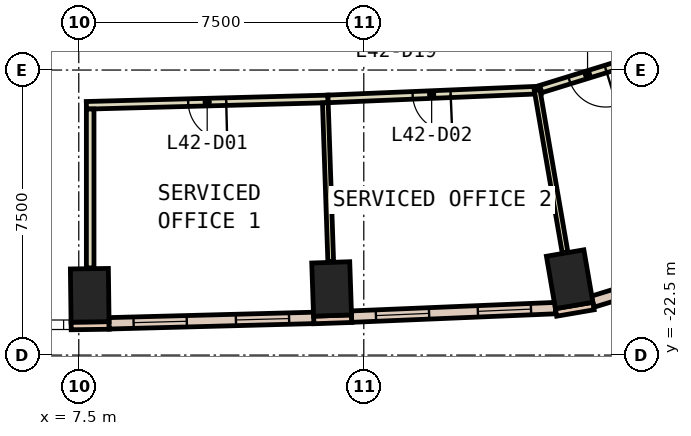
"""IFC4 building model, lengths in metres.
Left out: names, types, materials, properties, quantities, classifications, styles, units other than length and angle.
Written with IfcOpenShell. Run it as: python <this file> out.ifc"""

import sys

from ifc_helpers import new_model, si_unit, direction, frame, frame_2d, origin, origin_2d, place, context, subcontext, project, spatial, rectangle, extrude, element, fill, save


model = new_model("IFC4")
c1 = context("Model", 3, precision=1e-05, world=origin(), true_north=direction((0.0, 1.0)))
c2 = subcontext(c1, "Body", "Model", "MODEL_VIEW")
j1 = project(units=[si_unit("LENGTHUNIT", "METRE"), si_unit("PLANEANGLEUNIT", "RADIAN")], contexts=[c1])
p1 = place(None, origin())
s1 = spatial("IfcSite", under=j1, at=p1, CompositionType="ELEMENT")
p2 = place(p1, origin())
s2 = spatial("IfcBuilding", under=s1, at=p2, CompositionType="ELEMENT")
p3 = place(p2, frame((0.0, 0.0, 189.8)))
s3 = spatial("IfcBuildingStorey", under=s2, at=p3, CompositionType="ELEMENT", Elevation=189.8)
for number, where, z_axis, x_axis in (
    (1, (7.788, -20.927, 0.0), (0.0, 0.0, 1.0), (1.0, 0.013, 0.0)),
    (2, (14.154, -20.76, 0.0), (0.0, 0.0, 1.0), (0.999, 0.034, 0.0)),
    (3, (20.417, -20.505, 0.0), (0.0, 0.0, 1.0), (0.986, 0.169, 0.0)),
):
    element("IfcColumn", number, at=place(p3, frame(where, z_axis=z_axis, x_axis=x_axis)), inside=s3, PredefinedType="COLUMN", context=c2, shape_type="SweptSolid", body=[
        extrude(rectangle(XDim=1.0, YDim=1.4, at=origin_2d()), origin(), (0.0, 0.0, 1.0), 3.8),
    ])
p4 = place(p3, frame((7.299, -21.734, 0.0), z_axis=(0.0, 0.0, 1.0), x_axis=(0.999903186316, 0.013914668364, 0.0)))
e4 = element("IfcWall", 4, at=p4, inside=s3, PredefinedType="STANDARD", context=c2, shape_type="SweptSolid", body=[
    extrude(rectangle(XDim=1.0, YDim=0.2, at=frame_2d((0.5, 0.0))), origin(), (0.0, 0.0, 1.0), 3.8),
])
p5 = place(p3, frame((13.682, -21.576, 0.0), z_axis=(0.0, 0.0, 1.0), x_axis=(0.999423561854, 0.033949138587, 0.0)))
e5 = element("IfcWall", 5, at=p5, inside=s3, PredefinedType="STANDARD", context=c2, shape_type="SweptSolid", body=[
    extrude(rectangle(XDim=1.0, YDim=0.2, at=frame_2d((0.5, 0.0))), origin(), (0.0, 0.0, 1.0), 3.8),
])
p6 = place(p3, frame((20.059, -21.378, 0.0), z_axis=(0.0, 0.0, 1.0), x_axis=(0.985631544579, 0.168909615862, 0.0)))
e6 = element("IfcWall", 6, at=p6, inside=s3, PredefinedType="STANDARD", context=c2, shape_type="SweptSolid", body=[
    extrude(rectangle(XDim=1.0, YDim=0.2, at=frame_2d((0.5, 0.0))), origin(), (0.0, 0.0, 1.0), 3.8),
])
p7 = place(p3, frame((8.297, -21.664, 0.0), z_axis=(0.0, 0.0, 1.0), x_axis=(0.999651908676, 0.026382977093, 0.0)))
e7 = element("IfcWall", 7, at=p7, inside=s3, PredefinedType="STANDARD", context=c2, shape_type="SweptSolid", body=[
    extrude(rectangle(XDim=5.386, YDim=0.3, at=frame_2d((2.693, 0.0))), origin(), (0.0, 0.0, 1.0), 3.8),
])
p8 = place(p7, frame((0.646, 0.0, 0.9)))
e8 = element("IfcOpeningElement", 8, at=p8, cuts=e7, PredefinedType="OPENING", context=c2, shape_type="SweptSolid", body=[
    extrude(rectangle(XDim=1.4, YDim=2.6, at=frame_2d((0.7, 1.3))), frame((0.0, 0.16, 0.0), z_axis=(0.0, -1.0, 0.0), x_axis=(1.0, 0.0, 0.0)), (0.0, 0.0, 1.0), 0.32),
])
p9 = place(p7, frame((3.339, 0.0, 0.9)))
e9 = element("IfcOpeningElement", 9, at=p9, cuts=e7, PredefinedType="OPENING", context=c2, shape_type="SweptSolid", body=[
    extrude(rectangle(XDim=1.4, YDim=2.6, at=frame_2d((0.7, 1.3))), frame((0.0, 0.16, 0.0), z_axis=(0.0, -1.0, 0.0), x_axis=(1.0, 0.0, 0.0)), (0.0, 0.0, 1.0), 0.32),
])
p10 = place(p3, frame((14.678, -21.488, 0.0), z_axis=(0.0, 0.0, 1.0), x_axis=(0.999127941775, 0.041753514387, 0.0)))
e10 = element("IfcWall", 10, at=p10, inside=s3, PredefinedType="STANDARD", context=c2, shape_type="SweptSolid", body=[
    extrude(rectangle(XDim=5.368, YDim=0.3, at=frame_2d((2.684, 0.0))), origin(), (0.0, 0.0, 1.0), 3.8),
])
p11 = place(p10, frame((0.642, 0.0, 0.9)))
e11 = element("IfcOpeningElement", 11, at=p11, cuts=e10, PredefinedType="OPENING", context=c2, shape_type="SweptSolid", body=[
    extrude(rectangle(XDim=1.4, YDim=2.6, at=frame_2d((0.7, 1.3))), frame((0.0, 0.16, 0.0), z_axis=(0.0, -1.0, 0.0), x_axis=(1.0, 0.0, 0.0)), (0.0, 0.0, 1.0), 0.32),
])
p12 = place(p10, frame((3.326, 0.0, 0.9)))
e12 = element("IfcOpeningElement", 12, at=p12, cuts=e10, PredefinedType="OPENING", context=c2, shape_type="SweptSolid", body=[
    extrude(rectangle(XDim=1.4, YDim=2.6, at=frame_2d((0.7, 1.3))), frame((0.0, 0.16, 0.0), z_axis=(0.0, -1.0, 0.0), x_axis=(1.0, 0.0, 0.0)), (0.0, 0.0, 1.0), 0.32),
])
p13 = place(p3, frame((21.024, -21.095, 0.0), z_axis=(0.0, 0.0, 1.0), x_axis=(0.955692086233, 0.29436819854, 0.0)))
e13 = element("IfcWall", 13, at=p13, inside=s3, PredefinedType="STANDARD", context=c2, shape_type="SweptSolid", body=[
    extrude(rectangle(XDim=3.767, YDim=0.3, at=frame_2d((1.884, 0.0))), origin(), (0.0, 0.0, 1.0), 3.8),
])
p14 = place(p13, frame((1.183, 0.0, 0.9)))
e14 = element("IfcOpeningElement", 14, at=p14, cuts=e13, PredefinedType="OPENING", context=c2, shape_type="SweptSolid", body=[
    extrude(rectangle(XDim=1.4, YDim=2.6, at=frame_2d((0.7, 1.3))), frame((0.0, 0.16, 0.0), z_axis=(0.0, -1.0, 0.0), x_axis=(1.0, 0.0, 0.0)), (0.0, 0.0, 1.0), 0.32),
])
p15 = place(p3, frame((14.059, -15.76, 0.0), z_axis=(0.0, 0.0, 1.0), x_axis=(-0.999651338269, -0.026404580978, 0.0)))
e15 = element("IfcWall", 15, at=p15, inside=s3, PredefinedType="PARTITIONING", context=c2, shape_type="SweptSolid", body=[
    extrude(rectangle(XDim=6.361, YDim=0.2, at=frame_2d((3.181, 0.0))), origin(), (0.0, 0.0, 1.0), 3.8),
])
p16 = place(p15, frame((2.681, 0.0, 0.0)))
e16 = element("IfcOpeningElement", 16, at=p16, cuts=e15, PredefinedType="OPENING", context=c2, shape_type="SweptSolid", body=[
    extrude(rectangle(XDim=1.0, YDim=2.1, at=frame_2d((0.5, 1.05))), frame((0.0, 0.11, 0.0), z_axis=(0.0, -1.0, 0.0), x_axis=(1.0, 0.0, 0.0)), (0.0, 0.0, 1.0), 0.22),
])
p17 = place(p3, frame((19.661, -15.525, 0.0), z_axis=(0.0, 0.0, 1.0), x_axis=(-0.999127706659, -0.041759140148, 0.0)))
e17 = element("IfcWall", 17, at=p17, inside=s3, PredefinedType="PARTITIONING", context=c2, shape_type="SweptSolid", body=[
    extrude(rectangle(XDim=5.607, YDim=0.2, at=frame_2d((2.803, 0.0))), origin(), (0.0, 0.0, 1.0), 3.8),
])
p18 = place(p17, frame((2.378, 0.0, 0.0)))
e18 = element("IfcOpeningElement", 18, at=p18, cuts=e17, PredefinedType="OPENING", context=c2, shape_type="SweptSolid", body=[
    extrude(rectangle(XDim=1.0, YDim=2.1, at=frame_2d((0.5, 1.05))), frame((0.0, 0.11, 0.0), z_axis=(0.0, -1.0, 0.0), x_axis=(1.0, 0.0, 0.0)), (0.0, 0.0, 1.0), 0.22),
])
p19 = place(p3, frame((22.119, -14.741, 0.0), z_axis=(0.0, 0.0, 1.0), x_axis=(-0.955612889251, -0.294625195625, 0.0)))
e19 = element("IfcWall", 19, at=p19, inside=s3, PredefinedType="PARTITIONING", context=c2, shape_type="SweptSolid", body=[
    extrude(rectangle(XDim=2.576, YDim=0.2, at=frame_2d((1.288, 0.0))), origin(), (0.0, 0.0, 1.0), 3.8),
])
p20 = place(p19, frame((0.788, 0.0, 0.0)))
e20 = element("IfcOpeningElement", 20, at=p20, cuts=e19, PredefinedType="OPENING", context=c2, shape_type="SweptSolid", body=[
    extrude(rectangle(XDim=1.0, YDim=2.1, at=frame_2d((0.5, 1.05))), frame((0.0, 0.11, 0.0), z_axis=(0.0, -1.0, 0.0), x_axis=(1.0, 0.0, 0.0)), (0.0, 0.0, 1.0), 0.22),
])
p21 = place(p3, frame((7.8, -16.025, 0.0), z_axis=(0.0, 0.0, 1.0), x_axis=(0.0, -1.0, 0.0)))
e21 = element("IfcWall", 21, at=p21, inside=s3, PredefinedType="PARTITIONING", context=c2, shape_type="SweptSolid", body=[
    extrude(rectangle(XDim=4.182, YDim=0.2, at=frame_2d((2.091, 0.0))), origin(), (0.0, 0.0, 1.0), 3.8),
])
p22 = place(p3, frame((13.988, -15.862, 0.0), z_axis=(0.0, 0.0, 1.0), x_axis=(0.033931247732, -0.999424169423, 0.0)))
e22 = element("IfcWall", 22, at=p22, inside=s3, PredefinedType="PARTITIONING", context=c2, shape_type="SweptSolid", body=[
    extrude(rectangle(XDim=4.18, YDim=0.15, at=frame_2d((2.09, 0.0))), origin(), (0.0, 0.0, 1.0), 3.8),
])
p23 = place(p3, frame((19.561, -15.529, 0.0), z_axis=(0.0, 0.0, 1.0), x_axis=(0.169546150064, -0.98552224886, 0.0)))
e23 = element("IfcWall", 23, at=p23, inside=s3, PredefinedType="PARTITIONING", context=c2, shape_type="SweptSolid", body=[
    extrude(rectangle(XDim=4.329, YDim=0.15, at=frame_2d((2.164, 0.0))), origin(), (0.0, 0.0, 1.0), 3.8),
])
p24 = place(p8, origin())
e24 = element("IfcWindow", 24, at=p24, inside=s3, PartitioningType="SINGLE_PANEL", PredefinedType="WINDOW", context=c2, shape_type="SweptSolid", body=[
    extrude(rectangle(XDim=1.4, YDim=2.6, at=frame_2d((0.7, 1.3))), frame((0.0, 0.03, 0.0), z_axis=(0.0, -1.0, 0.0), x_axis=(1.0, 0.0, 0.0)), (0.0, 0.0, 1.0), 0.06),
])
fill(e8, e24)
p25 = place(p9, origin())
e25 = element("IfcWindow", 25, at=p25, inside=s3, PartitioningType="SINGLE_PANEL", PredefinedType="WINDOW", context=c2, shape_type="SweptSolid", body=[
    extrude(rectangle(XDim=1.4, YDim=2.6, at=frame_2d((0.7, 1.3))), frame((0.0, 0.03, 0.0), z_axis=(0.0, -1.0, 0.0), x_axis=(1.0, 0.0, 0.0)), (0.0, 0.0, 1.0), 0.06),
])
fill(e9, e25)
p26 = place(p11, origin())
e26 = element("IfcWindow", 26, at=p26, inside=s3, PartitioningType="SINGLE_PANEL", PredefinedType="WINDOW", context=c2, shape_type="SweptSolid", body=[
    extrude(rectangle(XDim=1.4, YDim=2.6, at=frame_2d((0.7, 1.3))), frame((0.0, 0.03, 0.0), z_axis=(0.0, -1.0, 0.0), x_axis=(1.0, 0.0, 0.0)), (0.0, 0.0, 1.0), 0.06),
])
fill(e11, e26)
p27 = place(p12, origin())
e27 = element("IfcWindow", 27, at=p27, inside=s3, PartitioningType="SINGLE_PANEL", PredefinedType="WINDOW", context=c2, shape_type="SweptSolid", body=[
    extrude(rectangle(XDim=1.4, YDim=2.6, at=frame_2d((0.7, 1.3))), frame((0.0, 0.03, 0.0), z_axis=(0.0, -1.0, 0.0), x_axis=(1.0, 0.0, 0.0)), (0.0, 0.0, 1.0), 0.06),
])
fill(e12, e27)
p28 = place(p16, origin())
e28 = element("IfcDoor", 28, at=p28, inside=s3, OperationType="SINGLE_SWING_LEFT", PredefinedType="DOOR", context=c2, shape_type="SweptSolid", body=[
    extrude(rectangle(XDim=1.0, YDim=2.1, at=frame_2d((0.5, 1.05))), frame((0.0, 0.025, 0.0), z_axis=(0.0, -1.0, 0.0), x_axis=(1.0, 0.0, 0.0)), (0.0, 0.0, 1.0), 0.05),
])
fill(e16, e28)
p29 = place(p18, origin())
e29 = element("IfcDoor", 29, at=p29, inside=s3, OperationType="SINGLE_SWING_LEFT", PredefinedType="DOOR", context=c2, shape_type="SweptSolid", body=[
    extrude(rectangle(XDim=1.0, YDim=2.1, at=frame_2d((0.5, 1.05))), frame((0.0, 0.025, 0.0), z_axis=(0.0, -1.0, 0.0), x_axis=(1.0, 0.0, 0.0)), (0.0, 0.0, 1.0), 0.05),
])
fill(e18, e29)
p30 = place(p20, origin())
e30 = element("IfcDoor", 30, at=p30, inside=s3, OperationType="SINGLE_SWING_LEFT", PredefinedType="DOOR", context=c2, shape_type="SweptSolid", body=[
    extrude(rectangle(XDim=1.0, YDim=2.1, at=frame_2d((0.5, 1.05))), frame((0.0, 0.025, 0.0), z_axis=(0.0, -1.0, 0.0), x_axis=(1.0, 0.0, 0.0)), (0.0, 0.0, 1.0), 0.05),
])
fill(e20, e30)
save(model, sys.argv[1])
